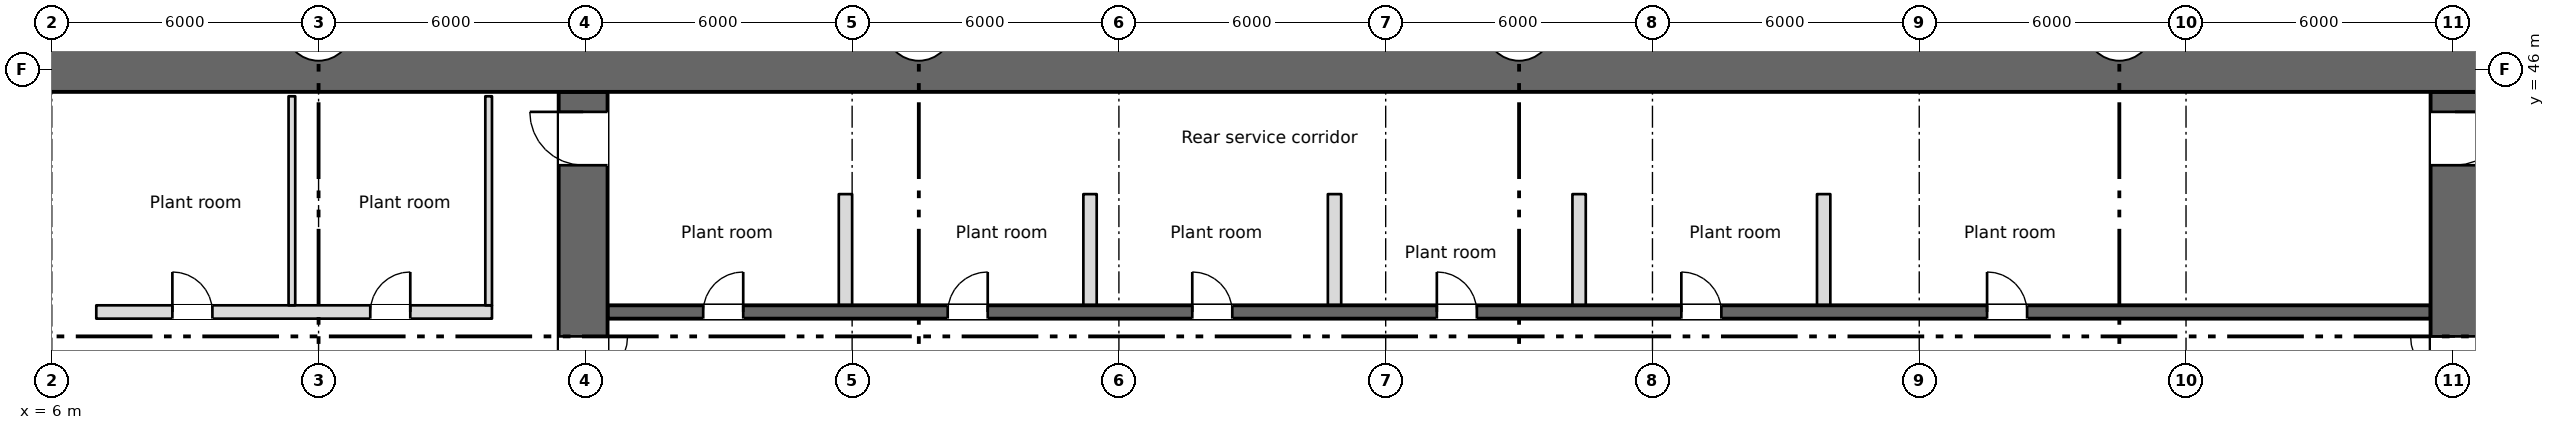
"""IFC4 building model, lengths in metres.
Left out: names, types, materials, properties, quantities, classifications, styles, units other than length and angle.
Written with IfcOpenShell. Run it as: python <this file> out.ifc"""

import sys

from ifc_helpers import new_model, si_unit, direction, frame, frame_2d, origin, place, context, subcontext, project, spatial, rectangle, extrude, element, fill, save


model = new_model("IFC4")
c1 = context("Model", 3, precision=1e-05, world=origin(), true_north=direction((0.0, 1.0)))
c2 = subcontext(c1, "Body", "Model", "MODEL_VIEW")
j1 = project(units=[si_unit("LENGTHUNIT", "METRE"), si_unit("PLANEANGLEUNIT", "RADIAN")], contexts=[c1])
p1 = place(None, origin())
s1 = spatial("IfcSite", under=j1, at=p1, CompositionType="ELEMENT")
p2 = place(p1, origin())
s2 = spatial("IfcBuilding", under=s1, at=p2, CompositionType="ELEMENT")
p3 = place(p2, frame((0.0, 0.0, -12.0)))
s3 = spatial("IfcBuildingStorey", under=s2, at=p3, CompositionType="ELEMENT", Elevation=-12.0)
p4 = place(p3, frame((-2.0, 46.0, 0.0), z_axis=(0.0, 0.0, 1.0), x_axis=(1.0, 0.0, 0.0)))
e1 = element("IfcWall", 1, at=p4, inside=s3, PredefinedType="SOLIDWALL", context=c2, shape_type="SweptSolid", body=[
    extrude(rectangle(XDim=82.0, YDim=1.0, at=frame_2d((41.0, 0.0))), origin(), (0.0, 0.0, 1.0), 5.55),
])
p5 = place(p3, frame((6.85, 28.4, 0.0), z_axis=(0.0, 0.0, 1.0), x_axis=(0.0, 1.0, 0.0)))
e2 = element("IfcWall", 2, at=p5, inside=s3, PredefinedType="SHEAR", context=c2, shape_type="SweptSolid", body=[
    extrude(rectangle(XDim=17.1, YDim=0.3, at=frame_2d((8.55, 0.0))), origin(), (0.0, 0.0, 1.0), 5.55),
])
p6 = place(p3, frame((17.95, 28.4, 0.0), z_axis=(0.0, 0.0, 1.0), x_axis=(0.0, 1.0, 0.0)))
e3 = element("IfcWall", 3, at=p6, inside=s3, PredefinedType="SHEAR", context=c2, shape_type="SweptSolid", body=[
    extrude(rectangle(XDim=17.1, YDim=1.1, at=frame_2d((8.55, 0.0))), origin(), (0.0, 0.0, 1.0), 5.55),
])
p7 = place(p6, frame((9.6, 0.0, 0.0)))
e4 = element("IfcOpeningElement", 4, at=p7, cuts=e3, PredefinedType="OPENING", context=c2, shape_type="SweptSolid", body=[
    extrude(rectangle(XDim=2.0, YDim=2.1, at=frame_2d((1.0, 1.05))), frame((0.0, 0.56, 0.0), z_axis=(0.0, -1.0, 0.0), x_axis=(1.0, 0.0, 0.0)), (0.0, 0.0, 1.0), 1.12),
])
p8 = place(p6, frame((15.45, 0.0, 0.0)))
e5 = element("IfcOpeningElement", 5, at=p8, cuts=e3, PredefinedType="OPENING", context=c2, shape_type="SweptSolid", body=[
    extrude(rectangle(XDim=1.2, YDim=2.1, at=frame_2d((0.6, 1.05))), frame((0.0, 0.56, 0.0), z_axis=(0.0, -1.0, 0.0), x_axis=(1.0, 0.0, 0.0)), (0.0, 0.0, 1.0), 1.12),
])
p9 = place(p3, frame((60.05, 28.4, 0.0), z_axis=(0.0, 0.0, 1.0), x_axis=(0.0, 1.0, 0.0)))
e6 = element("IfcWall", 6, at=p9, inside=s3, PredefinedType="SHEAR", context=c2, shape_type="SweptSolid", body=[
    extrude(rectangle(XDim=17.1, YDim=1.1, at=frame_2d((8.55, 0.0))), origin(), (0.0, 0.0, 1.0), 5.55),
])
p10 = place(p9, frame((9.6, 0.0, 0.0)))
e7 = element("IfcOpeningElement", 7, at=p10, cuts=e6, PredefinedType="OPENING", context=c2, shape_type="SweptSolid", body=[
    extrude(rectangle(XDim=2.0, YDim=2.1, at=frame_2d((1.0, 1.05))), frame((0.0, 0.56, 0.0), z_axis=(0.0, -1.0, 0.0), x_axis=(1.0, 0.0, 0.0)), (0.0, 0.0, 1.0), 1.12),
])
p11 = place(p9, frame((15.45, 0.0, 0.0)))
e8 = element("IfcOpeningElement", 8, at=p11, cuts=e6, PredefinedType="OPENING", context=c2, shape_type="SweptSolid", body=[
    extrude(rectangle(XDim=1.2, YDim=2.1, at=frame_2d((0.6, 1.05))), frame((0.0, 0.56, 0.0), z_axis=(0.0, -1.0, 0.0), x_axis=(1.0, 0.0, 0.0)), (0.0, 0.0, 1.0), 1.12),
])
p12 = place(p3, frame((18.5, 40.55, 0.0), z_axis=(0.0, 0.0, 1.0), x_axis=(1.0, 0.0, 0.0)))
e9 = element("IfcWall", 9, at=p12, inside=s3, PredefinedType="SHEAR", context=c2, shape_type="SweptSolid", body=[
    extrude(rectangle(XDim=41.0, YDim=0.3, at=frame_2d((20.5, 0.0))), origin(), (0.0, 0.0, 1.0), 5.55),
])
p13 = place(p12, frame((2.15, 0.0, 0.0)))
e10 = element("IfcOpeningElement", 10, at=p13, cuts=e9, PredefinedType="OPENING", context=c2, shape_type="SweptSolid", body=[
    extrude(rectangle(XDim=0.9, YDim=2.1, at=frame_2d((0.45, 1.05))), frame((0.0, 0.16, 0.0), z_axis=(0.0, -1.0, 0.0), x_axis=(1.0, 0.0, 0.0)), (0.0, 0.0, 1.0), 0.32),
])
p14 = place(p12, frame((7.65, 0.0, 0.0)))
e11 = element("IfcOpeningElement", 11, at=p14, cuts=e9, PredefinedType="OPENING", context=c2, shape_type="SweptSolid", body=[
    extrude(rectangle(XDim=0.9, YDim=2.1, at=frame_2d((0.45, 1.05))), frame((0.0, 0.16, 0.0), z_axis=(0.0, -1.0, 0.0), x_axis=(1.0, 0.0, 0.0)), (0.0, 0.0, 1.0), 0.32),
])
p15 = place(p12, frame((13.15, 0.0, 0.0)))
e12 = element("IfcOpeningElement", 12, at=p15, cuts=e9, PredefinedType="OPENING", context=c2, shape_type="SweptSolid", body=[
    extrude(rectangle(XDim=0.9, YDim=2.1, at=frame_2d((0.45, 1.05))), frame((0.0, 0.16, 0.0), z_axis=(0.0, -1.0, 0.0), x_axis=(1.0, 0.0, 0.0)), (0.0, 0.0, 1.0), 0.32),
])
p16 = place(p12, frame((18.65, 0.0, 0.0)))
e13 = element("IfcOpeningElement", 13, at=p16, cuts=e9, PredefinedType="OPENING", context=c2, shape_type="SweptSolid", body=[
    extrude(rectangle(XDim=0.9, YDim=2.1, at=frame_2d((0.45, 1.05))), frame((0.0, 0.16, 0.0), z_axis=(0.0, -1.0, 0.0), x_axis=(1.0, 0.0, 0.0)), (0.0, 0.0, 1.0), 0.32),
])
p17 = place(p12, frame((24.15, 0.0, 0.0)))
e14 = element("IfcOpeningElement", 14, at=p17, cuts=e9, PredefinedType="OPENING", context=c2, shape_type="SweptSolid", body=[
    extrude(rectangle(XDim=0.9, YDim=2.1, at=frame_2d((0.45, 1.05))), frame((0.0, 0.16, 0.0), z_axis=(0.0, -1.0, 0.0), x_axis=(1.0, 0.0, 0.0)), (0.0, 0.0, 1.0), 0.32),
])
p18 = place(p12, frame((31.025, 0.0, 0.0)))
e15 = element("IfcOpeningElement", 15, at=p18, cuts=e9, PredefinedType="OPENING", context=c2, shape_type="SweptSolid", body=[
    extrude(rectangle(XDim=0.9, YDim=2.1, at=frame_2d((0.45, 1.05))), frame((0.0, 0.16, 0.0), z_axis=(0.0, -1.0, 0.0), x_axis=(1.0, 0.0, 0.0)), (0.0, 0.0, 1.0), 0.32),
])
p19 = place(p12, frame((36.375, 0.0, 0.0)))
e16 = element("IfcOpeningElement", 16, at=p19, cuts=e9, PredefinedType="OPENING", context=c2, shape_type="SweptSolid", body=[
    extrude(rectangle(XDim=1.2, YDim=2.1, at=frame_2d((0.6, 1.05))), frame((0.0, 0.16, 0.0), z_axis=(0.0, -1.0, 0.0), x_axis=(1.0, 0.0, 0.0)), (0.0, 0.0, 1.0), 0.32),
])
p20 = place(p12, frame((39.15, 0.0, 0.0)))
e17 = element("IfcOpeningElement", 17, at=p20, cuts=e9, PredefinedType="OPENING", context=c2, shape_type="SweptSolid", body=[
    extrude(rectangle(XDim=1.2, YDim=2.1, at=frame_2d((0.6, 1.05))), frame((0.0, 0.16, 0.0), z_axis=(0.0, -1.0, 0.0), x_axis=(1.0, 0.0, 0.0)), (0.0, 0.0, 1.0), 0.32),
])
p21 = place(p3, frame((18.5, 43.35, 0.0), z_axis=(0.0, 0.0, 1.0), x_axis=(1.0, 0.0, 0.0)))
e18 = element("IfcWall", 18, at=p21, inside=s3, PredefinedType="SHEAR", context=c2, shape_type="SweptSolid", body=[
    extrude(rectangle(XDim=41.0, YDim=0.3, at=frame_2d((20.5, 0.0))), origin(), (0.0, 0.0, 1.0), 5.55),
])
p22 = place(p3, frame((7.0, 40.55, 0.0), z_axis=(0.0, 0.0, 1.0), x_axis=(1.0, 0.0, 0.0)))
e19 = element("IfcWall", 19, at=p22, inside=s3, PredefinedType="PARTITIONING", context=c2, shape_type="SweptSolid", body=[
    extrude(rectangle(XDim=8.9, YDim=0.3, at=frame_2d((4.45, 0.0))), origin(), (0.0, 0.0, 1.0), 5.55),
])
p23 = place(p22, frame((1.712, 0.0, 0.0)))
e20 = element("IfcOpeningElement", 20, at=p23, cuts=e19, PredefinedType="OPENING", context=c2, shape_type="SweptSolid", body=[
    extrude(rectangle(XDim=0.9, YDim=2.1, at=frame_2d((0.45, 1.05))), frame((0.0, 0.16, 0.0), z_axis=(0.0, -1.0, 0.0), x_axis=(1.0, 0.0, 0.0)), (0.0, 0.0, 1.0), 0.32),
])
p24 = place(p22, frame((6.163, 0.0, 0.0)))
e21 = element("IfcOpeningElement", 21, at=p24, cuts=e19, PredefinedType="OPENING", context=c2, shape_type="SweptSolid", body=[
    extrude(rectangle(XDim=0.9, YDim=2.1, at=frame_2d((0.45, 1.05))), frame((0.0, 0.16, 0.0), z_axis=(0.0, -1.0, 0.0), x_axis=(1.0, 0.0, 0.0)), (0.0, 0.0, 1.0), 0.32),
])
for number, where, z_axis, x_axis in (
    (22, (54.1, 40.7, 0.0), (0.0, 0.0, 1.0), (0.0, 1.0, 0.0)),
    (23, (56.85, 40.7, 0.0), (0.0, 0.0, 1.0), (0.0, 1.0, 0.0)),
):
    element("IfcWall", number, at=place(p3, frame(where, z_axis=z_axis, x_axis=x_axis)), inside=s3, PredefinedType="SHEAR", context=c2, shape_type="SweptSolid", body=[
        extrude(rectangle(XDim=2.5, YDim=0.3, at=frame_2d((1.25, 0.0))), origin(), (0.0, 0.0, 1.0), 5.55),
    ])
for number, where, z_axis, x_axis in (
    (24, (15.825, 40.7, 0.0), (0.0, 0.0, 1.0), (0.0, 1.0, 0.0)),
    (25, (11.4, 40.7, 0.0), (0.0, 0.0, 1.0), (0.0, 1.0, 0.0)),
):
    element("IfcWall", number, at=place(p3, frame(where, z_axis=z_axis, x_axis=x_axis)), inside=s3, PredefinedType="PARTITIONING", context=c2, shape_type="SweptSolid", body=[
        extrude(rectangle(XDim=4.7, YDim=0.15, at=frame_2d((2.35, 0.0))), origin(), (0.0, 0.0, 1.0), 5.55),
    ])
for number, where, z_axis, x_axis in (
    (26, (23.85, 40.7, 0.0), (0.0, 0.0, 1.0), (0.0, 1.0, 0.0)),
    (27, (29.35, 40.7, 0.0), (0.0, 0.0, 1.0), (0.0, 1.0, 0.0)),
    (28, (34.85, 40.7, 0.0), (0.0, 0.0, 1.0), (0.0, 1.0, 0.0)),
    (29, (40.35, 40.7, 0.0), (0.0, 0.0, 1.0), (0.0, 1.0, 0.0)),
    (30, (45.85, 40.7, 0.0), (0.0, 0.0, 1.0), (0.0, 1.0, 0.0)),
):
    element("IfcWall", number, at=place(p3, frame(where, z_axis=z_axis, x_axis=x_axis)), inside=s3, PredefinedType="PARTITIONING", context=c2, shape_type="SweptSolid", body=[
        extrude(rectangle(XDim=2.5, YDim=0.3, at=frame_2d((1.25, 0.0))), origin(), (0.0, 0.0, 1.0), 5.55),
    ])
p25 = place(p23, origin())
e31 = element("IfcDoor", 31, at=p25, inside=s3, OperationType="SINGLE_SWING_LEFT", PredefinedType="DOOR", context=c2, shape_type="SweptSolid", body=[
    extrude(rectangle(XDim=0.9, YDim=2.1, at=frame_2d((0.45, 1.05))), frame((0.0, 0.025, 0.0), z_axis=(0.0, -1.0, 0.0), x_axis=(1.0, 0.0, 0.0)), (0.0, 0.0, 1.0), 0.05),
])
fill(e20, e31)
p26 = place(p24, origin())
e32 = element("IfcDoor", 32, at=p26, inside=s3, OperationType="SINGLE_SWING_RIGHT", PredefinedType="DOOR", context=c2, shape_type="SweptSolid", body=[
    extrude(rectangle(XDim=0.9, YDim=2.1, at=frame_2d((0.45, 1.05))), frame((0.0, 0.025, 0.0), z_axis=(0.0, -1.0, 0.0), x_axis=(1.0, 0.0, 0.0)), (0.0, 0.0, 1.0), 0.05),
])
fill(e21, e32)
p27 = place(p13, origin())
e33 = element("IfcDoor", 33, at=p27, inside=s3, OperationType="SINGLE_SWING_RIGHT", PredefinedType="DOOR", context=c2, shape_type="SweptSolid", body=[
    extrude(rectangle(XDim=0.9, YDim=2.1, at=frame_2d((0.45, 1.05))), frame((0.0, 0.025, 0.0), z_axis=(0.0, -1.0, 0.0), x_axis=(1.0, 0.0, 0.0)), (0.0, 0.0, 1.0), 0.05),
])
fill(e10, e33)
p28 = place(p14, origin())
e34 = element("IfcDoor", 34, at=p28, inside=s3, OperationType="SINGLE_SWING_RIGHT", PredefinedType="DOOR", context=c2, shape_type="SweptSolid", body=[
    extrude(rectangle(XDim=0.9, YDim=2.1, at=frame_2d((0.45, 1.05))), frame((0.0, 0.025, 0.0), z_axis=(0.0, -1.0, 0.0), x_axis=(1.0, 0.0, 0.0)), (0.0, 0.0, 1.0), 0.05),
])
fill(e11, e34)
p29 = place(p15, origin())
e35 = element("IfcDoor", 35, at=p29, inside=s3, OperationType="SINGLE_SWING_LEFT", PredefinedType="DOOR", context=c2, shape_type="SweptSolid", body=[
    extrude(rectangle(XDim=0.9, YDim=2.1, at=frame_2d((0.45, 1.05))), frame((0.0, 0.025, 0.0), z_axis=(0.0, -1.0, 0.0), x_axis=(1.0, 0.0, 0.0)), (0.0, 0.0, 1.0), 0.05),
])
fill(e12, e35)
p30 = place(p16, origin())
e36 = element("IfcDoor", 36, at=p30, inside=s3, OperationType="SINGLE_SWING_LEFT", PredefinedType="DOOR", context=c2, shape_type="SweptSolid", body=[
    extrude(rectangle(XDim=0.9, YDim=2.1, at=frame_2d((0.45, 1.05))), frame((0.0, 0.025, 0.0), z_axis=(0.0, -1.0, 0.0), x_axis=(1.0, 0.0, 0.0)), (0.0, 0.0, 1.0), 0.05),
])
fill(e13, e36)
p31 = place(p17, origin())
e37 = element("IfcDoor", 37, at=p31, inside=s3, OperationType="SINGLE_SWING_LEFT", PredefinedType="DOOR", context=c2, shape_type="SweptSolid", body=[
    extrude(rectangle(XDim=0.9, YDim=2.1, at=frame_2d((0.45, 1.05))), frame((0.0, 0.025, 0.0), z_axis=(0.0, -1.0, 0.0), x_axis=(1.0, 0.0, 0.0)), (0.0, 0.0, 1.0), 0.05),
])
fill(e14, e37)
p32 = place(p18, origin())
e38 = element("IfcDoor", 38, at=p32, inside=s3, OperationType="SINGLE_SWING_LEFT", PredefinedType="DOOR", context=c2, shape_type="SweptSolid", body=[
    extrude(rectangle(XDim=0.9, YDim=2.1, at=frame_2d((0.45, 1.05))), frame((0.0, 0.025, 0.0), z_axis=(0.0, -1.0, 0.0), x_axis=(1.0, 0.0, 0.0)), (0.0, 0.0, 1.0), 0.05),
])
fill(e15, e38)
p33 = place(p19, origin())
e39 = element("IfcDoor", 39, at=p33, inside=s3, OperationType="SLIDING_TO_LEFT", PredefinedType="DOOR", context=c2, shape_type="SweptSolid", body=[
    extrude(rectangle(XDim=1.2, YDim=2.1, at=frame_2d((0.6, 1.05))), frame((0.0, 0.025, 0.0), z_axis=(0.0, -1.0, 0.0), x_axis=(1.0, 0.0, 0.0)), (0.0, 0.0, 1.0), 0.05),
])
fill(e16, e39)
p34 = place(p20, origin())
e40 = element("IfcDoor", 40, at=p34, inside=s3, OperationType="SLIDING_TO_LEFT", PredefinedType="DOOR", context=c2, shape_type="SweptSolid", body=[
    extrude(rectangle(XDim=1.2, YDim=2.1, at=frame_2d((0.6, 1.05))), frame((0.0, 0.025, 0.0), z_axis=(0.0, -1.0, 0.0), x_axis=(1.0, 0.0, 0.0)), (0.0, 0.0, 1.0), 0.05),
])
fill(e17, e40)
p35 = place(p7, origin())
e41 = element("IfcDoor", 41, at=p35, inside=s3, OperationType="DOUBLE_DOOR_SINGLE_SWING", PredefinedType="DOOR", context=c2, shape_type="SweptSolid", body=[
    extrude(rectangle(XDim=2.0, YDim=2.1, at=frame_2d((1.0, 1.05))), frame((0.0, 0.025, 0.0), z_axis=(0.0, -1.0, 0.0), x_axis=(1.0, 0.0, 0.0)), (0.0, 0.0, 1.0), 0.05),
])
fill(e4, e41)
p36 = place(p10, origin())
e42 = element("IfcDoor", 42, at=p36, inside=s3, OperationType="DOUBLE_DOOR_SINGLE_SWING", PredefinedType="DOOR", context=c2, shape_type="SweptSolid", body=[
    extrude(rectangle(XDim=2.0, YDim=2.1, at=frame_2d((1.0, 1.05))), frame((0.0, 0.025, 0.0), z_axis=(0.0, -1.0, 0.0), x_axis=(1.0, 0.0, 0.0)), (0.0, 0.0, 1.0), 0.05),
])
fill(e7, e42)
p37 = place(p8, origin())
e43 = element("IfcDoor", 43, at=p37, inside=s3, OperationType="SINGLE_SWING_RIGHT", PredefinedType="DOOR", context=c2, shape_type="SweptSolid", body=[
    extrude(rectangle(XDim=1.2, YDim=2.1, at=frame_2d((0.6, 1.05))), frame((0.0, 0.025, 0.0), z_axis=(0.0, -1.0, 0.0), x_axis=(1.0, 0.0, 0.0)), (0.0, 0.0, 1.0), 0.05),
])
fill(e5, e43)
p38 = place(p11, origin())
e44 = element("IfcDoor", 44, at=p38, inside=s3, OperationType="SINGLE_SWING_RIGHT", PredefinedType="DOOR", context=c2, shape_type="SweptSolid", body=[
    extrude(rectangle(XDim=1.2, YDim=2.1, at=frame_2d((0.6, 1.05))), frame((0.0, 0.025, 0.0), z_axis=(0.0, -1.0, 0.0), x_axis=(1.0, 0.0, 0.0)), (0.0, 0.0, 1.0), 0.05),
])
fill(e8, e44)
save(model, sys.argv[1])
